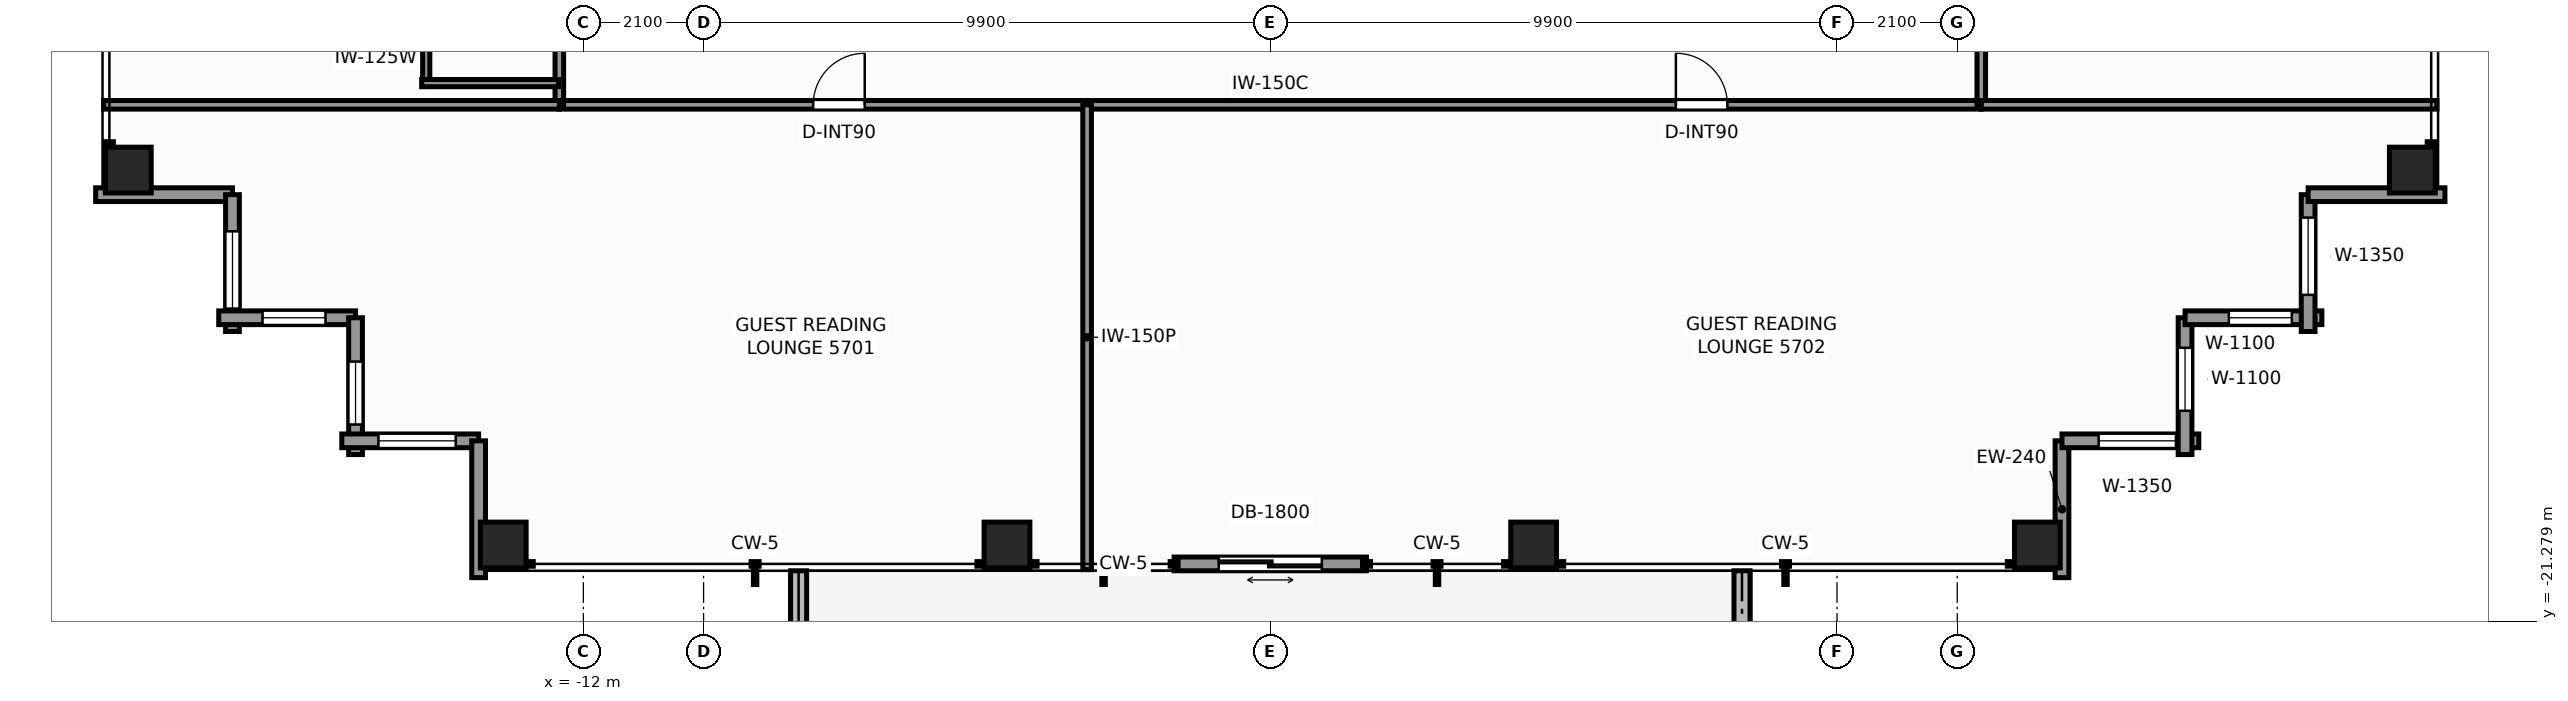
"""IFC4 building model, lengths in metres.
Left out: names, types, materials, properties, quantities, classifications, styles, units other than length and angle.
Written with IfcOpenShell. Run it as: python <this file> out.ifc"""

import sys

from ifc_helpers import new_model, si_unit, direction, frame, frame_2d, origin, origin_2d, place, context, subcontext, project, spatial, rectangle, extrude, element, fill, save


model = new_model("IFC4")
c1 = context("Model", 3, precision=1e-05, world=origin(), true_north=direction((0.0, 1.0)))
c2 = subcontext(c1, "Body", "Model", "MODEL_VIEW")
j1 = project(units=[si_unit("LENGTHUNIT", "METRE"), si_unit("PLANEANGLEUNIT", "RADIAN")], contexts=[c1])
p1 = place(None, origin())
s1 = spatial("IfcSite", under=j1, at=p1, CompositionType="ELEMENT")
p2 = place(p1, origin())
s2 = spatial("IfcBuilding", under=s1, at=p2, CompositionType="ELEMENT")
p3 = place(p2, frame((0.0, 0.0, 196.5)))
s3 = spatial("IfcBuildingStorey", under=s2, at=p3, CompositionType="ELEMENT", Elevation=196.5)
for number, where, z_axis, x_axis in (
    (1, (-13.4, -19.95, 0.0), (0.0, 0.0, 1.0), (1.0, 0.0, 0.0)),
    (2, (-4.6, -19.95, 0.0), (0.0, 0.0, 1.0), (1.0, 0.0, 0.0)),
    (3, (4.6, -19.95, 0.0), (0.0, 0.0, 1.0), (1.0, 0.0, 0.0)),
    (4, (13.4, -19.95, 0.0), (0.0, 0.0, 1.0), (1.0, 0.0, 0.0)),
    (5, (-19.95, -13.4, 0.0), (0.0, 0.0, 1.0), (1.0, 0.0, 0.0)),
    (6, (19.95, -13.4, 0.0), (0.0, 0.0, 1.0), (1.0, 0.0, 0.0)),
):
    element("IfcColumn", number, at=place(p3, frame(where, z_axis=z_axis, x_axis=x_axis)), inside=s3, PredefinedType="COLUMN", context=c2, shape_type="SweptSolid", body=[
        extrude(rectangle(XDim=0.8, YDim=0.8, at=origin_2d()), origin(), (0.0, 0.0, 1.0), 3.3),
    ])
p4 = place(p3, frame((8.24, -23.82, -0.04), z_axis=(0.0, 0.0, 1.0), x_axis=(0.0, 1.0, 0.0)))
e7 = element("IfcWall", 7, at=p4, inside=s3, PredefinedType="PARAPET", context=c2, shape_type="SweptSolid", body=[
    extrude(rectangle(XDim=3.42, YDim=0.28, at=frame_2d((1.71, 0.0))), origin(), (0.0, 0.0, 1.0), 0.42),
])
p5 = place(p3, frame((-8.24, -20.4, -0.04), z_axis=(0.0, 0.0, 1.0), x_axis=(0.0, -1.0, 0.0)))
e8 = element("IfcWall", 8, at=p5, inside=s3, PredefinedType="PARAPET", context=c2, shape_type="SweptSolid", body=[
    extrude(rectangle(XDim=2.674, YDim=0.28, at=frame_2d((1.337, 0.0))), origin(), (0.0, 0.0, 1.0), 0.42),
])
p6 = place(p3, frame((1.68, -20.28, 0.0), z_axis=(0.0, 0.0, 1.0), x_axis=(-1.0, 0.0, 0.0)))
e9 = element("IfcWall", 9, at=p6, inside=s3, PredefinedType="STANDARD", context=c2, shape_type="SweptSolid", body=[
    extrude(rectangle(XDim=3.36, YDim=0.24, at=frame_2d((1.68, 0.0))), origin(), (0.0, 0.0, 1.0), 3.08),
])
p7 = place(p6, frame((0.78, 0.0, 0.0)))
e10 = element("IfcOpeningElement", 10, at=p7, cuts=e9, PredefinedType="OPENING", context=c2, shape_type="SweptSolid", body=[
    extrude(rectangle(XDim=1.8, YDim=2.2, at=frame_2d((0.9, 1.1))), frame((0.0, 0.13, 0.0), z_axis=(0.0, -1.0, 0.0), x_axis=(1.0, 0.0, 0.0)), (0.0, 0.0, 1.0), 0.26),
])
p8 = place(p3, frame((13.83, -18.13, 0.0), z_axis=(0.0, 0.0, 1.0), x_axis=(0.0, -1.0, 0.0)))
e11 = element("IfcWall", 11, at=p8, inside=s3, PredefinedType="STANDARD", context=c2, shape_type="SweptSolid", body=[
    extrude(rectangle(XDim=2.39, YDim=0.24, at=frame_2d((1.195, 0.0))), origin(), (0.0, 0.0, 1.0), 2.463),
])
p9 = place(p3, frame((16.22, -18.13, 0.0), z_axis=(0.0, 0.0, 1.0), x_axis=(-1.0, 0.0, 0.0)))
e12 = element("IfcWall", 12, at=p9, inside=s3, PredefinedType="STANDARD", context=c2, shape_type="SweptSolid", body=[
    extrude(rectangle(XDim=2.39, YDim=0.24, at=frame_2d((1.195, 0.0))), origin(), (0.0, 0.0, 1.0), 2.463),
])
p10 = place(p9, frame((0.4, 0.0, 0.65)))
e13 = element("IfcOpeningElement", 13, at=p10, cuts=e12, PredefinedType="OPENING", context=c2, shape_type="SweptSolid", body=[
    extrude(rectangle(XDim=1.35, YDim=1.55, at=frame_2d((0.675, 0.775))), frame((0.0, 0.13, 0.0), z_axis=(0.0, -1.0, 0.0), x_axis=(1.0, 0.0, 0.0)), (0.0, 0.0, 1.0), 0.26),
])
p11 = place(p3, frame((15.98, -15.98, 0.0), z_axis=(0.0, 0.0, 1.0), x_axis=(0.0, -1.0, 0.0)))
e14 = element("IfcWall", 14, at=p11, inside=s3, PredefinedType="STANDARD", context=c2, shape_type="SweptSolid", body=[
    extrude(rectangle(XDim=2.39, YDim=0.24, at=frame_2d((1.195, 0.0))), origin(), (0.0, 0.0, 1.0), 2.463),
])
p12 = place(p11, frame((0.525, 0.0, 0.65)))
e15 = element("IfcOpeningElement", 15, at=p12, cuts=e14, PredefinedType="OPENING", context=c2, shape_type="SweptSolid", body=[
    extrude(rectangle(XDim=1.1, YDim=1.45, at=frame_2d((0.55, 0.725))), frame((0.0, 0.13, 0.0), z_axis=(0.0, -1.0, 0.0), x_axis=(1.0, 0.0, 0.0)), (0.0, 0.0, 1.0), 0.26),
])
p13 = place(p3, frame((18.37, -15.98, 0.0), z_axis=(0.0, 0.0, 1.0), x_axis=(-1.0, 0.0, 0.0)))
e16 = element("IfcWall", 16, at=p13, inside=s3, PredefinedType="STANDARD", context=c2, shape_type="SweptSolid", body=[
    extrude(rectangle(XDim=2.39, YDim=0.24, at=frame_2d((1.195, 0.0))), origin(), (0.0, 0.0, 1.0), 2.463),
])
p14 = place(p13, frame((0.525, 0.0, 0.65)))
e17 = element("IfcOpeningElement", 17, at=p14, cuts=e16, PredefinedType="OPENING", context=c2, shape_type="SweptSolid", body=[
    extrude(rectangle(XDim=1.1, YDim=1.45, at=frame_2d((0.55, 0.725))), frame((0.0, 0.13, 0.0), z_axis=(0.0, -1.0, 0.0), x_axis=(1.0, 0.0, 0.0)), (0.0, 0.0, 1.0), 0.26),
])
p15 = place(p3, frame((18.13, -13.83, 0.0), z_axis=(0.0, 0.0, 1.0), x_axis=(0.0, -1.0, 0.0)))
e18 = element("IfcWall", 18, at=p15, inside=s3, PredefinedType="STANDARD", context=c2, shape_type="SweptSolid", body=[
    extrude(rectangle(XDim=2.39, YDim=0.24, at=frame_2d((1.195, 0.0))), origin(), (0.0, 0.0, 1.0), 2.463),
])
p16 = place(p15, frame((0.4, 0.0, 0.65)))
e19 = element("IfcOpeningElement", 19, at=p16, cuts=e18, PredefinedType="OPENING", context=c2, shape_type="SweptSolid", body=[
    extrude(rectangle(XDim=1.35, YDim=1.55, at=frame_2d((0.675, 0.775))), frame((0.0, 0.13, 0.0), z_axis=(0.0, -1.0, 0.0), x_axis=(1.0, 0.0, 0.0)), (0.0, 0.0, 1.0), 0.26),
])
for number, where, z_axis, x_axis in (
    (20, (20.52, -13.83, 0.0), (0.0, 0.0, 1.0), (-1.0, 0.0, 0.0)),
    (21, (-18.13, -13.83, 0.0), (0.0, 0.0, 1.0), (-1.0, 0.0, 0.0)),
):
    element("IfcWall", number, at=place(p3, frame(where, z_axis=z_axis, x_axis=x_axis)), inside=s3, PredefinedType="STANDARD", context=c2, shape_type="SweptSolid", body=[
        extrude(rectangle(XDim=2.39, YDim=0.24, at=frame_2d((1.195, 0.0))), origin(), (0.0, 0.0, 1.0), 2.463),
    ])
p17 = place(p3, frame((-18.13, -16.22, 0.0), z_axis=(0.0, 0.0, 1.0), x_axis=(0.0, 1.0, 0.0)))
e22 = element("IfcWall", 22, at=p17, inside=s3, PredefinedType="STANDARD", context=c2, shape_type="SweptSolid", body=[
    extrude(rectangle(XDim=2.39, YDim=0.24, at=frame_2d((1.195, 0.0))), origin(), (0.0, 0.0, 1.0), 2.463),
])
p18 = place(p17, frame((0.4, 0.0, 0.65)))
e23 = element("IfcOpeningElement", 23, at=p18, cuts=e22, PredefinedType="OPENING", context=c2, shape_type="SweptSolid", body=[
    extrude(rectangle(XDim=1.35, YDim=1.55, at=frame_2d((0.675, 0.775))), frame((0.0, 0.13, 0.0), z_axis=(0.0, -1.0, 0.0), x_axis=(1.0, 0.0, 0.0)), (0.0, 0.0, 1.0), 0.26),
])
p19 = place(p3, frame((-15.98, -15.98, 0.0), z_axis=(0.0, 0.0, 1.0), x_axis=(-1.0, 0.0, 0.0)))
e24 = element("IfcWall", 24, at=p19, inside=s3, PredefinedType="STANDARD", context=c2, shape_type="SweptSolid", body=[
    extrude(rectangle(XDim=2.39, YDim=0.24, at=frame_2d((1.195, 0.0))), origin(), (0.0, 0.0, 1.0), 2.463),
])
p20 = place(p19, frame((0.525, 0.0, 0.65)))
e25 = element("IfcOpeningElement", 25, at=p20, cuts=e24, PredefinedType="OPENING", context=c2, shape_type="SweptSolid", body=[
    extrude(rectangle(XDim=1.1, YDim=1.45, at=frame_2d((0.55, 0.725))), frame((0.0, 0.13, 0.0), z_axis=(0.0, -1.0, 0.0), x_axis=(1.0, 0.0, 0.0)), (0.0, 0.0, 1.0), 0.26),
])
p21 = place(p3, frame((-15.98, -18.37, 0.0), z_axis=(0.0, 0.0, 1.0), x_axis=(0.0, 1.0, 0.0)))
e26 = element("IfcWall", 26, at=p21, inside=s3, PredefinedType="STANDARD", context=c2, shape_type="SweptSolid", body=[
    extrude(rectangle(XDim=2.39, YDim=0.24, at=frame_2d((1.195, 0.0))), origin(), (0.0, 0.0, 1.0), 2.463),
])
p22 = place(p21, frame((0.525, 0.0, 0.65)))
e27 = element("IfcOpeningElement", 27, at=p22, cuts=e26, PredefinedType="OPENING", context=c2, shape_type="SweptSolid", body=[
    extrude(rectangle(XDim=1.1, YDim=1.45, at=frame_2d((0.55, 0.725))), frame((0.0, 0.13, 0.0), z_axis=(0.0, -1.0, 0.0), x_axis=(1.0, 0.0, 0.0)), (0.0, 0.0, 1.0), 0.26),
])
p23 = place(p3, frame((-13.83, -18.13, 0.0), z_axis=(0.0, 0.0, 1.0), x_axis=(-1.0, 0.0, 0.0)))
e28 = element("IfcWall", 28, at=p23, inside=s3, PredefinedType="STANDARD", context=c2, shape_type="SweptSolid", body=[
    extrude(rectangle(XDim=2.39, YDim=0.24, at=frame_2d((1.195, 0.0))), origin(), (0.0, 0.0, 1.0), 2.463),
])
p24 = place(p23, frame((0.4, 0.0, 0.65)))
e29 = element("IfcOpeningElement", 29, at=p24, cuts=e28, PredefinedType="OPENING", context=c2, shape_type="SweptSolid", body=[
    extrude(rectangle(XDim=1.35, YDim=1.55, at=frame_2d((0.675, 0.775))), frame((0.0, 0.13, 0.0), z_axis=(0.0, -1.0, 0.0), x_axis=(1.0, 0.0, 0.0)), (0.0, 0.0, 1.0), 0.26),
])
p25 = place(p3, frame((-13.83, -20.52, 0.0), z_axis=(0.0, 0.0, 1.0), x_axis=(0.0, 1.0, 0.0)))
e30 = element("IfcWall", 30, at=p25, inside=s3, PredefinedType="STANDARD", context=c2, shape_type="SweptSolid", body=[
    extrude(rectangle(XDim=2.39, YDim=0.24, at=frame_2d((1.195, 0.0))), origin(), (0.0, 0.0, 1.0), 2.463),
])
p26 = place(p3, frame((-12.42, -12.26, 0.0), z_axis=(0.0, 0.0, 1.0), x_axis=(1.0, 0.0, 0.0)))
e31 = element("IfcWall", 31, at=p26, inside=s3, PredefinedType="PARTITIONING", context=c2, shape_type="SweptSolid", body=[
    extrude(rectangle(XDim=24.84, YDim=0.15, at=frame_2d((12.42, 0.0))), origin(), (0.0, 0.0, 1.0), 2.369),
])
p27 = place(p26, frame((4.435, 0.0, 0.0)))
e32 = element("IfcOpeningElement", 32, at=p27, cuts=e31, PredefinedType="OPENING", context=c2, shape_type="SweptSolid", body=[
    extrude(rectangle(XDim=0.9, YDim=2.06, at=frame_2d((0.45, 1.03))), frame((0.0, 0.085, 0.0), z_axis=(0.0, -1.0, 0.0), x_axis=(1.0, 0.0, 0.0)), (0.0, 0.0, 1.0), 0.17),
])
p28 = place(p26, frame((19.505, 0.0, 0.0)))
e33 = element("IfcOpeningElement", 33, at=p28, cuts=e31, PredefinedType="OPENING", context=c2, shape_type="SweptSolid", body=[
    extrude(rectangle(XDim=0.9, YDim=2.06, at=frame_2d((0.45, 1.03))), frame((0.0, 0.085, 0.0), z_axis=(0.0, -1.0, 0.0), x_axis=(1.0, 0.0, 0.0)), (0.0, 0.0, 1.0), 0.17),
])
p29 = place(p3, frame((-12.42, -12.26, 0.0), z_axis=(0.0, 0.0, 1.0), x_axis=(0.0, 1.0, 0.0)))
e34 = element("IfcWall", 34, at=p29, inside=s3, PredefinedType="PARTITIONING", context=c2, shape_type="SweptSolid", body=[
    extrude(rectangle(XDim=24.84, YDim=0.15, at=frame_2d((12.42, 0.0))), origin(), (0.0, 0.0, 1.0), 2.369),
])
p30 = place(p29, frame((3.573, 0.0, 0.0)))
e35 = element("IfcOpeningElement", 35, at=p30, cuts=e34, PredefinedType="OPENING", context=c2, shape_type="SweptSolid", body=[
    extrude(rectangle(XDim=0.95, YDim=2.06, at=frame_2d((0.475, 1.03))), frame((0.0, 0.085, 0.0), z_axis=(0.0, -1.0, 0.0), x_axis=(1.0, 0.0, 0.0)), (0.0, 0.0, 1.0), 0.17),
])
p31 = place(p29, frame((9.755, 0.0, 0.0)))
e36 = element("IfcOpeningElement", 36, at=p31, cuts=e34, PredefinedType="OPENING", context=c2, shape_type="SweptSolid", body=[
    extrude(rectangle(XDim=0.95, YDim=2.06, at=frame_2d((0.475, 1.03))), frame((0.0, 0.085, 0.0), z_axis=(0.0, -1.0, 0.0), x_axis=(1.0, 0.0, 0.0)), (0.0, 0.0, 1.0), 0.17),
])
p32 = place(p29, frame((19.32, 0.0, 0.0)))
e37 = element("IfcOpeningElement", 37, at=p32, cuts=e34, PredefinedType="OPENING", context=c2, shape_type="SweptSolid", body=[
    extrude(rectangle(XDim=0.95, YDim=2.06, at=frame_2d((0.475, 1.03))), frame((0.0, 0.085, 0.0), z_axis=(0.0, -1.0, 0.0), x_axis=(1.0, 0.0, 0.0)), (0.0, 0.0, 1.0), 0.17),
])
p33 = place(p3, frame((12.42, -12.26, 0.0), z_axis=(0.0, 0.0, 1.0), x_axis=(0.0, 1.0, 0.0)))
e38 = element("IfcWall", 38, at=p33, inside=s3, PredefinedType="PARTITIONING", context=c2, shape_type="SweptSolid", body=[
    extrude(rectangle(XDim=24.84, YDim=0.15, at=frame_2d((12.42, 0.0))), origin(), (0.0, 0.0, 1.0), 2.369),
])
p34 = place(p33, frame((2.944, 0.0, 0.0)))
e39 = element("IfcOpeningElement", 39, at=p34, cuts=e38, PredefinedType="OPENING", context=c2, shape_type="SweptSolid", body=[
    extrude(rectangle(XDim=0.9, YDim=2.06, at=frame_2d((0.45, 1.03))), frame((0.0, 0.085, 0.0), z_axis=(0.0, -1.0, 0.0), x_axis=(1.0, 0.0, 0.0)), (0.0, 0.0, 1.0), 0.17),
])
p35 = place(p33, frame((5.279, 0.0, 0.0)))
e40 = element("IfcOpeningElement", 40, at=p35, cuts=e38, PredefinedType="OPENING", context=c2, shape_type="SweptSolid", body=[
    extrude(rectangle(XDim=0.9, YDim=2.06, at=frame_2d((0.45, 1.03))), frame((0.0, 0.085, 0.0), z_axis=(0.0, -1.0, 0.0), x_axis=(1.0, 0.0, 0.0)), (0.0, 0.0, 1.0), 0.17),
])
p36 = place(p33, frame((13.602, 0.0, 0.0)))
e41 = element("IfcOpeningElement", 41, at=p36, cuts=e38, PredefinedType="OPENING", context=c2, shape_type="SweptSolid", body=[
    extrude(rectangle(XDim=0.9, YDim=2.06, at=frame_2d((0.45, 1.03))), frame((0.0, 0.085, 0.0), z_axis=(0.0, -1.0, 0.0), x_axis=(1.0, 0.0, 0.0)), (0.0, 0.0, 1.0), 0.17),
])
p37 = place(p33, frame((19.098, 0.0, 0.0)))
e42 = element("IfcOpeningElement", 42, at=p37, cuts=e38, PredefinedType="OPENING", context=c2, shape_type="SweptSolid", body=[
    extrude(rectangle(XDim=0.95, YDim=2.06, at=frame_2d((0.475, 1.03))), frame((0.0, 0.085, 0.0), z_axis=(0.0, -1.0, 0.0), x_axis=(1.0, 0.0, 0.0)), (0.0, 0.0, 1.0), 0.17),
])
p38 = place(p33, frame((20.836, 0.0, 0.0)))
e43 = element("IfcOpeningElement", 43, at=p38, cuts=e38, PredefinedType="OPENING", context=c2, shape_type="SweptSolid", body=[
    extrude(rectangle(XDim=0.9, YDim=2.06, at=frame_2d((0.45, 1.03))), frame((0.0, 0.085, 0.0), z_axis=(0.0, -1.0, 0.0), x_axis=(1.0, 0.0, 0.0)), (0.0, 0.0, 1.0), 0.17),
])
for number, where, z_axis, x_axis in (
    (44, (-20.38, -12.26, 0.0), (0.0, 0.0, 1.0), (1.0, 0.0, 0.0)),
    (45, (12.42, -12.26, 0.0), (0.0, 0.0, 1.0), (1.0, 0.0, 0.0)),
):
    element("IfcWall", number, at=place(p3, frame(where, z_axis=z_axis, x_axis=x_axis)), inside=s3, PredefinedType="PARTITIONING", context=c2, shape_type="SweptSolid", body=[
        extrude(rectangle(XDim=7.96, YDim=0.15, at=frame_2d((3.98, 0.0))), origin(), (0.0, 0.0, 1.0), 2.369),
    ])
p39 = place(p3, frame((-3.2, -20.38, 0.0), z_axis=(0.0, 0.0, 1.0), x_axis=(0.0, 1.0, 0.0)))
e46 = element("IfcWall", 46, at=p39, inside=s3, PredefinedType="PARTITIONING", context=c2, shape_type="SweptSolid", body=[
    extrude(rectangle(XDim=8.12, YDim=0.15, at=frame_2d((4.06, 0.0))), origin(), (0.0, 0.0, 1.0), 2.369),
])
p40 = place(p3, frame((-14.745, -11.941, 0.0), z_axis=(0.0, 0.0, 1.0), x_axis=(0.0, 1.0, 0.0)))
e47 = element("IfcWall", 47, at=p40, inside=s3, PredefinedType="PARTITIONING", context=c2, shape_type="SweptSolid", body=[
    extrude(rectangle(XDim=2.77, YDim=0.125, at=frame_2d((1.385, 0.0))), origin(), (0.0, 0.0, 1.0), 2.369),
])
p41 = place(p3, frame((-14.825, -11.881, 0.0), z_axis=(0.0, 0.0, 1.0), x_axis=(1.0, 0.0, 0.0)))
e48 = element("IfcWall", 48, at=p41, inside=s3, PredefinedType="PARTITIONING", context=c2, shape_type="SweptSolid", body=[
    extrude(rectangle(XDim=2.39, YDim=0.125, at=frame_2d((1.195, 0.0))), origin(), (0.0, 0.0, 1.0), 3.08),
])
p42 = place(p7, origin())
e49 = element("IfcDoor", 49, at=p42, inside=s3, OperationType="DOUBLE_DOOR_SLIDING", PredefinedType="DOOR", context=c2, shape_type="SweptSolid", body=[
    extrude(rectangle(XDim=1.8, YDim=2.2, at=frame_2d((0.9, 1.1))), frame((0.0, 0.025, 0.0), z_axis=(0.0, -1.0, 0.0), x_axis=(1.0, 0.0, 0.0)), (0.0, 0.0, 1.0), 0.05),
])
fill(e10, e49)
p43 = place(p10, origin())
e50 = element("IfcWindow", 50, at=p43, inside=s3, PartitioningType="SINGLE_PANEL", PredefinedType="WINDOW", context=c2, shape_type="SweptSolid", body=[
    extrude(rectangle(XDim=1.35, YDim=1.55, at=frame_2d((0.675, 0.775))), frame((0.0, 0.03, 0.0), z_axis=(0.0, -1.0, 0.0), x_axis=(1.0, 0.0, 0.0)), (0.0, 0.0, 1.0), 0.06),
])
fill(e13, e50)
p44 = place(p12, origin())
e51 = element("IfcWindow", 51, at=p44, inside=s3, PartitioningType="SINGLE_PANEL", PredefinedType="WINDOW", context=c2, shape_type="SweptSolid", body=[
    extrude(rectangle(XDim=1.1, YDim=1.45, at=frame_2d((0.55, 0.725))), frame((0.0, 0.03, 0.0), z_axis=(0.0, -1.0, 0.0), x_axis=(1.0, 0.0, 0.0)), (0.0, 0.0, 1.0), 0.06),
])
fill(e15, e51)
p45 = place(p14, origin())
e52 = element("IfcWindow", 52, at=p45, inside=s3, PartitioningType="SINGLE_PANEL", PredefinedType="WINDOW", context=c2, shape_type="SweptSolid", body=[
    extrude(rectangle(XDim=1.1, YDim=1.45, at=frame_2d((0.55, 0.725))), frame((0.0, 0.03, 0.0), z_axis=(0.0, -1.0, 0.0), x_axis=(1.0, 0.0, 0.0)), (0.0, 0.0, 1.0), 0.06),
])
fill(e17, e52)
p46 = place(p16, origin())
e53 = element("IfcWindow", 53, at=p46, inside=s3, PartitioningType="SINGLE_PANEL", PredefinedType="WINDOW", context=c2, shape_type="SweptSolid", body=[
    extrude(rectangle(XDim=1.35, YDim=1.55, at=frame_2d((0.675, 0.775))), frame((0.0, 0.03, 0.0), z_axis=(0.0, -1.0, 0.0), x_axis=(1.0, 0.0, 0.0)), (0.0, 0.0, 1.0), 0.06),
])
fill(e19, e53)
p47 = place(p18, origin())
e54 = element("IfcWindow", 54, at=p47, inside=s3, PartitioningType="SINGLE_PANEL", PredefinedType="WINDOW", context=c2, shape_type="SweptSolid", body=[
    extrude(rectangle(XDim=1.35, YDim=1.55, at=frame_2d((0.675, 0.775))), frame((0.0, 0.03, 0.0), z_axis=(0.0, -1.0, 0.0), x_axis=(1.0, 0.0, 0.0)), (0.0, 0.0, 1.0), 0.06),
])
fill(e23, e54)
p48 = place(p20, origin())
e55 = element("IfcWindow", 55, at=p48, inside=s3, PartitioningType="SINGLE_PANEL", PredefinedType="WINDOW", context=c2, shape_type="SweptSolid", body=[
    extrude(rectangle(XDim=1.1, YDim=1.45, at=frame_2d((0.55, 0.725))), frame((0.0, 0.03, 0.0), z_axis=(0.0, -1.0, 0.0), x_axis=(1.0, 0.0, 0.0)), (0.0, 0.0, 1.0), 0.06),
])
fill(e25, e55)
p49 = place(p22, origin())
e56 = element("IfcWindow", 56, at=p49, inside=s3, PartitioningType="SINGLE_PANEL", PredefinedType="WINDOW", context=c2, shape_type="SweptSolid", body=[
    extrude(rectangle(XDim=1.1, YDim=1.45, at=frame_2d((0.55, 0.725))), frame((0.0, 0.03, 0.0), z_axis=(0.0, -1.0, 0.0), x_axis=(1.0, 0.0, 0.0)), (0.0, 0.0, 1.0), 0.06),
])
fill(e27, e56)
p50 = place(p24, origin())
e57 = element("IfcWindow", 57, at=p50, inside=s3, PartitioningType="SINGLE_PANEL", PredefinedType="WINDOW", context=c2, shape_type="SweptSolid", body=[
    extrude(rectangle(XDim=1.35, YDim=1.55, at=frame_2d((0.675, 0.775))), frame((0.0, 0.03, 0.0), z_axis=(0.0, -1.0, 0.0), x_axis=(1.0, 0.0, 0.0)), (0.0, 0.0, 1.0), 0.06),
])
fill(e29, e57)
p51 = place(p27, origin())
e58 = element("IfcDoor", 58, at=p51, inside=s3, OperationType="SINGLE_SWING_RIGHT", PredefinedType="DOOR", context=c2, shape_type="SweptSolid", body=[
    extrude(rectangle(XDim=0.9, YDim=2.06, at=frame_2d((0.45, 1.03))), frame((0.0, 0.025, 0.0), z_axis=(0.0, -1.0, 0.0), x_axis=(1.0, 0.0, 0.0)), (0.0, 0.0, 1.0), 0.05),
])
fill(e32, e58)
p52 = place(p28, origin())
e59 = element("IfcDoor", 59, at=p52, inside=s3, OperationType="SINGLE_SWING_LEFT", PredefinedType="DOOR", context=c2, shape_type="SweptSolid", body=[
    extrude(rectangle(XDim=0.9, YDim=2.06, at=frame_2d((0.45, 1.03))), frame((0.0, 0.025, 0.0), z_axis=(0.0, -1.0, 0.0), x_axis=(1.0, 0.0, 0.0)), (0.0, 0.0, 1.0), 0.05),
])
fill(e33, e59)
save(model, sys.argv[1])
